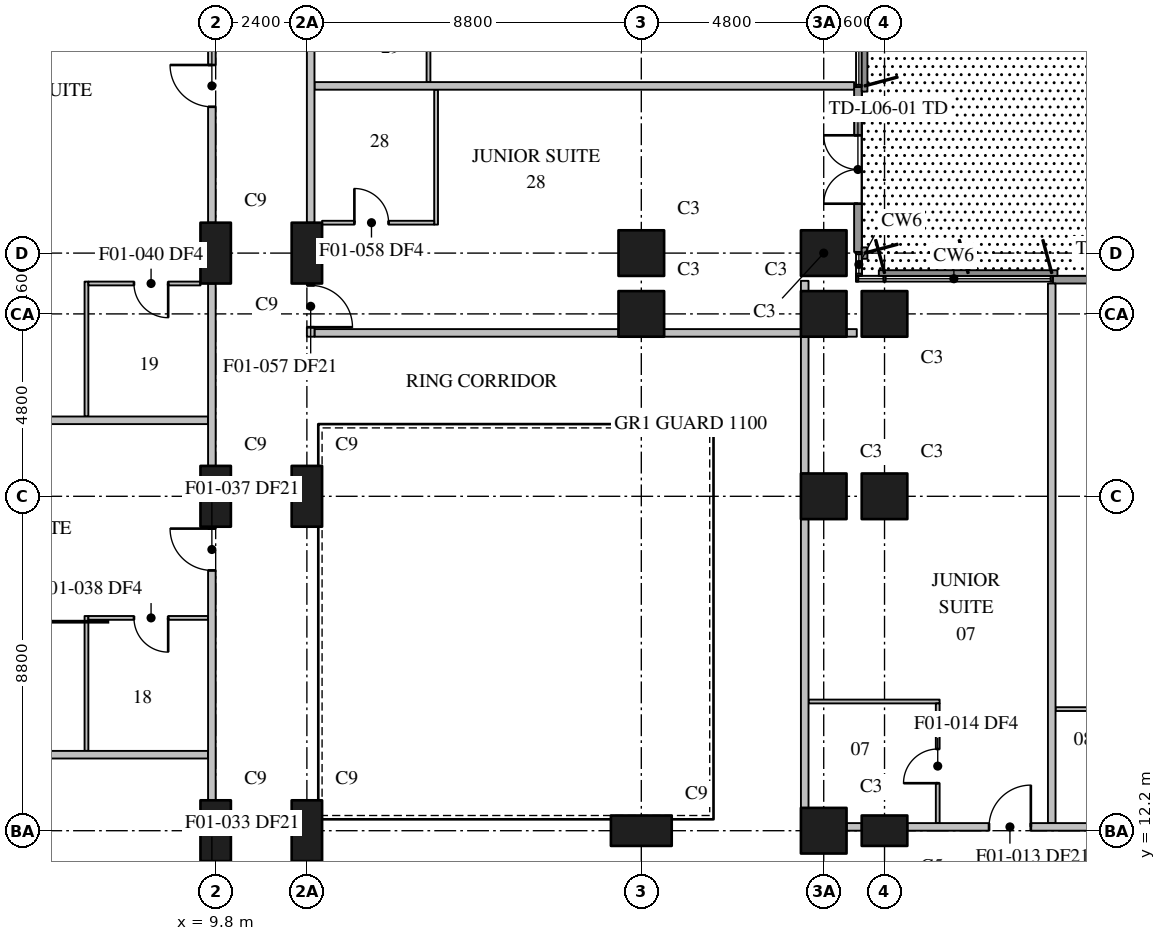
"""IFC4 building model, lengths in metres.
Left out: names, types, materials, properties, quantities, classifications, styles, units other than length and angle.
Written with IfcOpenShell. Run it as: python <this file> out.ifc"""

import sys

from ifc_helpers import new_model, si_unit, direction, frame, frame_2d, origin, origin_2d, place, context, subcontext, project, spatial, rectangle, extrude, element, fill, save


model = new_model("IFC4")
c1 = context("Model", 3, precision=1e-05, world=origin(), true_north=direction((0.0, 1.0)))
c2 = subcontext(c1, "Body", "Model", "MODEL_VIEW")
j1 = project(units=[si_unit("LENGTHUNIT", "METRE"), si_unit("PLANEANGLEUNIT", "RADIAN")], contexts=[c1])
p1 = place(None, origin())
s1 = spatial("IfcSite", under=j1, at=p1, CompositionType="ELEMENT")
p2 = place(p1, origin())
s2 = spatial("IfcBuilding", under=s1, at=p2, CompositionType="ELEMENT")
p3 = place(p2, frame((0.0, 0.0, 34.0)))
s3 = spatial("IfcBuildingStorey", under=s2, at=p3, CompositionType="ELEMENT", Elevation=34.0)
for number, where, z_axis, x_axis in (
    (1, (9.8, 12.2, 0.0), (0.0, 0.0, 1.0), (0.0, 1.0, 0.0)),
    (2, (9.8, 21.0, 0.0), (0.0, 0.0, 1.0), (0.0, 1.0, 0.0)),
    (3, (9.8, 27.4, 0.0), (0.0, 0.0, 1.0), (0.0, 1.0, 0.0)),
    (4, (12.2, 12.2, 0.0), (0.0, 0.0, 1.0), (0.0, 1.0, 0.0)),
    (5, (12.2, 21.0, 0.0), (0.0, 0.0, 1.0), (0.0, 1.0, 0.0)),
    (6, (12.2, 27.4, 0.0), (0.0, 0.0, 1.0), (0.0, 1.0, 0.0)),
    (7, (21.0, 12.2, 0.0), (0.0, 0.0, 1.0), (1.0, 0.0, 0.0)),
):
    element("IfcColumn", number, at=place(p3, frame(where, z_axis=z_axis, x_axis=x_axis)), inside=s3, PredefinedType="COLUMN", context=c2, shape_type="SweptSolid", body=[
        extrude(rectangle(XDim=1.6, YDim=0.8, at=origin_2d()), origin(), (0.0, 0.0, 1.0), 3.7),
    ])
for number, where, z_axis, x_axis in (
    (8, (21.0, 25.8, 0.0), (0.0, 0.0, 1.0), (1.0, 0.0, 0.0)),
    (9, (21.0, 27.4, 0.0), (0.0, 0.0, 1.0), (1.0, 0.0, 0.0)),
    (10, (25.8, 12.2, 0.0), (0.0, 0.0, 1.0), (1.0, 0.0, 0.0)),
    (11, (25.8, 21.0, 0.0), (0.0, 0.0, 1.0), (1.0, 0.0, 0.0)),
    (12, (25.8, 25.8, 0.0), (0.0, 0.0, 1.0), (1.0, 0.0, 0.0)),
    (13, (25.8, 27.4, 0.0), (0.0, 0.0, 1.0), (1.0, 0.0, 0.0)),
):
    element("IfcColumn", number, at=place(p3, frame(where, z_axis=z_axis, x_axis=x_axis)), inside=s3, PredefinedType="COLUMN", context=c2, shape_type="SweptSolid", body=[
        extrude(rectangle(XDim=1.2, YDim=1.2, at=origin_2d()), origin(), (0.0, 0.0, 1.0), 3.7),
    ])
p4 = place(p3, frame((27.4, 12.2, 0.0), z_axis=(0.0, 0.0, 1.0), x_axis=(1.0, 0.0, 0.0)))
e14 = element("IfcColumn", 14, at=p4, inside=s3, PredefinedType="COLUMN", context=c2, shape_type="SweptSolid", body=[
    extrude(rectangle(XDim=1.2, YDim=0.8, at=origin_2d()), origin(), (0.0, 0.0, 1.0), 3.7),
])
for number, where, z_axis, x_axis in (
    (15, (27.4, 21.0, 0.0), (0.0, 0.0, 1.0), (1.0, 0.0, 0.0)),
    (16, (27.4, 25.8, 0.0), (0.0, 0.0, 1.0), (1.0, 0.0, 0.0)),
):
    element("IfcColumn", number, at=place(p3, frame(where, z_axis=z_axis, x_axis=x_axis)), inside=s3, PredefinedType="COLUMN", context=c2, shape_type="SweptSolid", body=[
        extrude(rectangle(XDim=1.2, YDim=1.2, at=origin_2d()), origin(), (0.0, 0.0, 1.0), 3.7),
    ])
p5 = place(p3, frame((36.17, 26.7, 0.0), z_axis=(0.0, 0.0, 1.0), x_axis=(-1.0, 0.0, 0.0)))
e17 = element("IfcWall", 17, at=p5, inside=s3, PredefinedType="STANDARD", context=c2, shape_type="SweptSolid", body=[
    extrude(rectangle(XDim=4.34, YDim=0.2, at=frame_2d((2.17, 0.0))), origin(), (0.0, 0.0, 1.0), 3.4),
])
p6 = place(p5, frame((1.27, 0.0, 0.0)))
e18 = element("IfcOpeningElement", 18, at=p6, cuts=e17, PredefinedType="OPENING", context=c2, shape_type="SweptSolid", body=[
    extrude(rectangle(XDim=1.8, YDim=2.4, at=frame_2d((0.9, 1.2))), frame((0.0, 0.11, 0.0), z_axis=(0.0, -1.0, 0.0), x_axis=(1.0, 0.0, 0.0)), (0.0, 0.0, 1.0), 0.22),
])
p7 = place(p3, frame((26.7, 27.43, 0.0), z_axis=(0.0, 0.0, 1.0), x_axis=(0.0, 1.0, 0.0)))
e19 = element("IfcWall", 19, at=p7, inside=s3, PredefinedType="STANDARD", context=c2, shape_type="SweptSolid", body=[
    extrude(rectangle(XDim=4.34, YDim=0.2, at=frame_2d((2.17, 0.0))), origin(), (0.0, 0.0, 1.0), 3.4),
])
p8 = place(p7, frame((1.27, 0.0, 0.0)))
e20 = element("IfcOpeningElement", 20, at=p8, cuts=e19, PredefinedType="OPENING", context=c2, shape_type="SweptSolid", body=[
    extrude(rectangle(XDim=1.8, YDim=2.4, at=frame_2d((0.9, 1.2))), frame((0.0, 0.11, 0.0), z_axis=(0.0, -1.0, 0.0), x_axis=(1.0, 0.0, 0.0)), (0.0, 0.0, 1.0), 0.22),
])
p9 = place(p3, frame((26.4, 12.3, 0.0), z_axis=(0.0, 0.0, 1.0), x_axis=(1.0, 0.0, 0.0)))
e21 = element("IfcWall", 21, at=p9, inside=s3, PredefinedType="PARTITIONING", context=c2, shape_type="SweptSolid", body=[
    extrude(rectangle(XDim=0.4, YDim=0.2, at=frame_2d((0.2, 0.0))), origin(), (0.0, 0.0, 1.0), 3.4),
])
p10 = place(p3, frame((28.0, 12.3, 0.0), z_axis=(0.0, 0.0, 1.0), x_axis=(1.0, 0.0, 0.0)))
e22 = element("IfcWall", 22, at=p10, inside=s3, PredefinedType="PARTITIONING", context=c2, shape_type="SweptSolid", body=[
    extrude(rectangle(XDim=7.4, YDim=0.2, at=frame_2d((3.7, 0.0))), origin(), (0.0, 0.0, 1.0), 3.4),
])
p11 = place(p10, frame((2.15, 0.0, 0.0)))
e23 = element("IfcOpeningElement", 23, at=p11, cuts=e22, PredefinedType="OPENING", context=c2, shape_type="SweptSolid", body=[
    extrude(rectangle(XDim=1.1, YDim=2.1, at=frame_2d((0.55, 1.05))), frame((0.0, 0.11, 0.0), z_axis=(0.0, -1.0, 0.0), x_axis=(1.0, 0.0, 0.0)), (0.0, 0.0, 1.0), 0.22),
])
p12 = place(p10, frame((6.35, 0.0, 0.0)))
e24 = element("IfcOpeningElement", 24, at=p12, cuts=e22, PredefinedType="OPENING", context=c2, shape_type="SweptSolid", body=[
    extrude(rectangle(XDim=1.0, YDim=2.1, at=frame_2d((0.5, 1.05))), frame((0.0, 0.11, 0.0), z_axis=(0.0, -1.0, 0.0), x_axis=(1.0, 0.0, 0.0)), (0.0, 0.0, 1.0), 0.22),
])
p13 = place(p3, frame((25.3, 12.8, 0.0), z_axis=(0.0, 0.0, 1.0), x_axis=(0.0, 1.0, 0.0)))
e25 = element("IfcWall", 25, at=p13, inside=s3, PredefinedType="PARTITIONING", context=c2, shape_type="SweptSolid", body=[
    extrude(rectangle(XDim=7.6, YDim=0.2, at=frame_2d((3.8, 0.0))), origin(), (0.0, 0.0, 1.0), 3.4),
])
p14 = place(p3, frame((25.3, 21.6, 0.0), z_axis=(0.0, 0.0, 1.0), x_axis=(0.0, 1.0, 0.0)))
e26 = element("IfcWall", 26, at=p14, inside=s3, PredefinedType="PARTITIONING", context=c2, shape_type="SweptSolid", body=[
    extrude(rectangle(XDim=3.6, YDim=0.2, at=frame_2d((1.8, 0.0))), origin(), (0.0, 0.0, 1.0), 3.4),
])
p15 = place(p3, frame((25.3, 26.4, 0.0), z_axis=(0.0, 0.0, 1.0), x_axis=(0.0, 1.0, 0.0)))
e27 = element("IfcWall", 27, at=p15, inside=s3, PredefinedType="PARTITIONING", context=c2, shape_type="SweptSolid", body=[
    extrude(rectangle(XDim=0.27, YDim=0.2, at=frame_2d((0.135, 0.0))), origin(), (0.0, 0.0, 1.0), 3.4),
])
p16 = place(p3, frame((31.8, 12.4, 0.0), z_axis=(0.0, 0.0, 1.0), x_axis=(0.0, 1.0, 0.0)))
e28 = element("IfcWall", 28, at=p16, inside=s3, PredefinedType="PARTITIONING", context=c2, shape_type="SweptSolid", body=[
    extrude(rectangle(XDim=14.2, YDim=0.2, at=frame_2d((7.1, 0.0))), origin(), (0.0, 0.0, 1.0), 3.4),
])
p17 = place(p3, frame((9.7, 13.0, 0.0), z_axis=(0.0, 0.0, 1.0), x_axis=(0.0, 1.0, 0.0)))
e29 = element("IfcWall", 29, at=p17, inside=s3, PredefinedType="PARTITIONING", context=c2, shape_type="SweptSolid", body=[
    extrude(rectangle(XDim=7.2, YDim=0.2, at=frame_2d((3.6, 0.0))), origin(), (0.0, 0.0, 1.0), 3.4),
])
p18 = place(p17, frame((6.05, 0.0, 0.0)))
e30 = element("IfcOpeningElement", 30, at=p18, cuts=e29, PredefinedType="OPENING", context=c2, shape_type="SweptSolid", body=[
    extrude(rectangle(XDim=1.1, YDim=2.1, at=frame_2d((0.55, 1.05))), frame((0.0, 0.11, 0.0), z_axis=(0.0, -1.0, 0.0), x_axis=(1.0, 0.0, 0.0)), (0.0, 0.0, 1.0), 0.22),
])
p19 = place(p3, frame((9.7, 21.8, 0.0), z_axis=(0.0, 0.0, 1.0), x_axis=(0.0, 1.0, 0.0)))
e31 = element("IfcWall", 31, at=p19, inside=s3, PredefinedType="PARTITIONING", context=c2, shape_type="SweptSolid", body=[
    extrude(rectangle(XDim=4.8, YDim=0.2, at=frame_2d((2.4, 0.0))), origin(), (0.0, 0.0, 1.0), 3.4),
])
p20 = place(p3, frame((9.7, 28.2, 0.0), z_axis=(0.0, 0.0, 1.0), x_axis=(0.0, 1.0, 0.0)))
e32 = element("IfcWall", 32, at=p20, inside=s3, PredefinedType="PARTITIONING", context=c2, shape_type="SweptSolid", body=[
    extrude(rectangle(XDim=7.2, YDim=0.2, at=frame_2d((3.6, 0.0))), origin(), (0.0, 0.0, 1.0), 3.4),
])
p21 = place(p20, frame((3.05, 0.0, 0.0)))
e33 = element("IfcOpeningElement", 33, at=p21, cuts=e32, PredefinedType="OPENING", context=c2, shape_type="SweptSolid", body=[
    extrude(rectangle(XDim=1.1, YDim=2.1, at=frame_2d((0.55, 1.05))), frame((0.0, 0.11, 0.0), z_axis=(0.0, -1.0, 0.0), x_axis=(1.0, 0.0, 0.0)), (0.0, 0.0, 1.0), 0.22),
])
for number, where, z_axis, x_axis in (
    (34, (0.31, 14.2, 0.0), (0.0, 0.0, 1.0), (1.0, 0.0, 0.0)),
    (35, (0.31, 23.0, 0.0), (0.0, 0.0, 1.0), (1.0, 0.0, 0.0)),
):
    element("IfcWall", number, at=place(p3, frame(where, z_axis=z_axis, x_axis=x_axis)), inside=s3, PredefinedType="PARTITIONING", context=c2, shape_type="SweptSolid", body=[
        extrude(rectangle(XDim=9.29, YDim=0.2, at=frame_2d((4.645, 0.0))), origin(), (0.0, 0.0, 1.0), 3.4),
    ])
p22 = place(p3, frame((12.3, 26.6, 0.0), z_axis=(0.0, 0.0, 1.0), x_axis=(0.0, -1.0, 0.0)))
e36 = element("IfcWall", 36, at=p22, inside=s3, PredefinedType="PARTITIONING", context=c2, shape_type="SweptSolid", body=[
    extrude(rectangle(XDim=1.4, YDim=0.2, at=frame_2d((0.7, 0.0))), origin(), (0.0, 0.0, 1.0), 3.4),
])
p23 = place(p22, frame((0.05, 0.0, 0.0)))
e37 = element("IfcOpeningElement", 37, at=p23, cuts=e36, PredefinedType="OPENING", context=c2, shape_type="SweptSolid", body=[
    extrude(rectangle(XDim=1.1, YDim=2.1, at=frame_2d((0.55, 1.05))), frame((0.0, 0.11, 0.0), z_axis=(0.0, -1.0, 0.0), x_axis=(1.0, 0.0, 0.0)), (0.0, 0.0, 1.0), 0.22),
])
p24 = place(p3, frame((12.3, 35.4, 0.0), z_axis=(0.0, 0.0, 1.0), x_axis=(0.0, -1.0, 0.0)))
e38 = element("IfcWall", 38, at=p24, inside=s3, PredefinedType="PARTITIONING", context=c2, shape_type="SweptSolid", body=[
    extrude(rectangle(XDim=7.2, YDim=0.2, at=frame_2d((3.6, 0.0))), origin(), (0.0, 0.0, 1.0), 3.4),
])
p25 = place(p24, frame((0.05, 0.0, 0.0)))
e39 = element("IfcOpeningElement", 39, at=p25, cuts=e38, PredefinedType="OPENING", context=c2, shape_type="SweptSolid", body=[
    extrude(rectangle(XDim=1.0, YDim=2.1, at=frame_2d((0.5, 1.05))), frame((0.0, 0.11, 0.0), z_axis=(0.0, -1.0, 0.0), x_axis=(1.0, 0.0, 0.0)), (0.0, 0.0, 1.0), 0.22),
])
p26 = place(p3, frame((12.4, 25.3, 0.0), z_axis=(0.0, 0.0, 1.0), x_axis=(1.0, 0.0, 0.0)))
e40 = element("IfcWall", 40, at=p26, inside=s3, PredefinedType="PARTITIONING", context=c2, shape_type="SweptSolid", body=[
    extrude(rectangle(XDim=8.0, YDim=0.2, at=frame_2d((4.0, 0.0))), origin(), (0.0, 0.0, 1.0), 3.4),
])
p27 = place(p3, frame((21.6, 25.3, 0.0), z_axis=(0.0, 0.0, 1.0), x_axis=(1.0, 0.0, 0.0)))
e41 = element("IfcWall", 41, at=p27, inside=s3, PredefinedType="PARTITIONING", context=c2, shape_type="SweptSolid", body=[
    extrude(rectangle(XDim=3.6, YDim=0.2, at=frame_2d((1.8, 0.0))), origin(), (0.0, 0.0, 1.0), 3.4),
])
p28 = place(p3, frame((26.4, 25.3, 0.0), z_axis=(0.0, 0.0, 1.0), x_axis=(1.0, 0.0, 0.0)))
e42 = element("IfcWall", 42, at=p28, inside=s3, PredefinedType="PARTITIONING", context=c2, shape_type="SweptSolid", body=[
    extrude(rectangle(XDim=0.27, YDim=0.2, at=frame_2d((0.135, 0.0))), origin(), (0.0, 0.0, 1.0), 3.4),
])
p29 = place(p3, frame((12.4, 31.8, 0.0), z_axis=(0.0, 0.0, 1.0), x_axis=(1.0, 0.0, 0.0)))
e43 = element("IfcWall", 43, at=p29, inside=s3, PredefinedType="PARTITIONING", context=c2, shape_type="SweptSolid", body=[
    extrude(rectangle(XDim=14.2, YDim=0.2, at=frame_2d((7.1, 0.0))), origin(), (0.0, 0.0, 1.0), 3.4),
])
p30 = place(p3, frame((25.4, 15.6, 0.0), z_axis=(0.0, 0.0, 1.0), x_axis=(1.0, 0.0, 0.0)))
e44 = element("IfcWall", 44, at=p30, inside=s3, PredefinedType="PARTITIONING", context=c2, shape_type="SweptSolid", body=[
    extrude(rectangle(XDim=3.45, YDim=0.1, at=frame_2d((1.725, 0.0))), origin(), (0.0, 0.0, 1.0), 3.4),
])
p31 = place(p3, frame((28.8, 12.4, 0.0), z_axis=(0.0, 0.0, 1.0), x_axis=(0.0, 1.0, 0.0)))
e45 = element("IfcWall", 45, at=p31, inside=s3, PredefinedType="PARTITIONING", context=c2, shape_type="SweptSolid", body=[
    extrude(rectangle(XDim=3.15, YDim=0.1, at=frame_2d((1.575, 0.0))), origin(), (0.0, 0.0, 1.0), 3.4),
])
p32 = place(p31, frame((1.05, 0.0, 0.0)))
e46 = element("IfcOpeningElement", 46, at=p32, cuts=e45, PredefinedType="OPENING", context=c2, shape_type="SweptSolid", body=[
    extrude(rectangle(XDim=0.9, YDim=2.1, at=frame_2d((0.45, 1.05))), frame((0.0, 0.06, 0.0), z_axis=(0.0, -1.0, 0.0), x_axis=(1.0, 0.0, 0.0)), (0.0, 0.0, 1.0), 0.12),
])
p33 = place(p3, frame((31.9, 15.4, 0.0), z_axis=(0.0, 0.0, 1.0), x_axis=(1.0, 0.0, 0.0)))
e47 = element("IfcWall", 47, at=p33, inside=s3, PredefinedType="PARTITIONING", context=c2, shape_type="SweptSolid", body=[
    extrude(rectangle(XDim=2.25, YDim=0.1, at=frame_2d((1.125, 0.0))), origin(), (0.0, 0.0, 1.0), 3.4),
])
p34 = place(p3, frame((6.4, 14.3, 0.0), z_axis=(0.0, 0.0, 1.0), x_axis=(0.0, 1.0, 0.0)))
e48 = element("IfcWall", 48, at=p34, inside=s3, PredefinedType="PARTITIONING", context=c2, shape_type="SweptSolid", body=[
    extrude(rectangle(XDim=3.55, YDim=0.1, at=frame_2d((1.775, 0.0))), origin(), (0.0, 0.0, 1.0), 3.4),
])
p35 = place(p3, frame((6.4, 23.1, 0.0), z_axis=(0.0, 0.0, 1.0), x_axis=(0.0, 1.0, 0.0)))
e49 = element("IfcWall", 49, at=p35, inside=s3, PredefinedType="PARTITIONING", context=c2, shape_type="SweptSolid", body=[
    extrude(rectangle(XDim=3.55, YDim=0.1, at=frame_2d((1.775, 0.0))), origin(), (0.0, 0.0, 1.0), 3.4),
])
p36 = place(p3, frame((9.6, 17.8, 0.0), z_axis=(0.0, 0.0, 1.0), x_axis=(-1.0, 0.0, 0.0)))
e50 = element("IfcWall", 50, at=p36, inside=s3, PredefinedType="PARTITIONING", context=c2, shape_type="SweptSolid", body=[
    extrude(rectangle(XDim=3.15, YDim=0.1, at=frame_2d((1.575, 0.0))), origin(), (0.0, 0.0, 1.0), 3.4),
])
p37 = place(p36, frame((1.05, 0.0, 0.0)))
e51 = element("IfcOpeningElement", 51, at=p37, cuts=e50, PredefinedType="OPENING", context=c2, shape_type="SweptSolid", body=[
    extrude(rectangle(XDim=0.9, YDim=2.1, at=frame_2d((0.45, 1.05))), frame((0.0, 0.06, 0.0), z_axis=(0.0, -1.0, 0.0), x_axis=(1.0, 0.0, 0.0)), (0.0, 0.0, 1.0), 0.12),
])
p38 = place(p3, frame((9.4, 26.6, 0.0), z_axis=(0.0, 0.0, 1.0), x_axis=(-1.0, 0.0, 0.0)))
e52 = element("IfcWall", 52, at=p38, inside=s3, PredefinedType="PARTITIONING", context=c2, shape_type="SweptSolid", body=[
    extrude(rectangle(XDim=2.95, YDim=0.1, at=frame_2d((1.475, 0.0))), origin(), (0.0, 0.0, 1.0), 3.4),
])
p39 = place(p38, frame((0.85, 0.0, 0.0)))
e53 = element("IfcOpeningElement", 53, at=p39, cuts=e52, PredefinedType="OPENING", context=c2, shape_type="SweptSolid", body=[
    extrude(rectangle(XDim=0.9, YDim=2.1, at=frame_2d((0.45, 1.05))), frame((0.0, 0.06, 0.0), z_axis=(0.0, -1.0, 0.0), x_axis=(1.0, 0.0, 0.0)), (0.0, 0.0, 1.0), 0.12),
])
p40 = place(p3, frame((15.6, 28.15, 0.0), z_axis=(0.0, 0.0, 1.0), x_axis=(0.0, 1.0, 0.0)))
e54 = element("IfcWall", 54, at=p40, inside=s3, PredefinedType="PARTITIONING", context=c2, shape_type="SweptSolid", body=[
    extrude(rectangle(XDim=3.55, YDim=0.1, at=frame_2d((1.775, 0.0))), origin(), (0.0, 0.0, 1.0), 3.4),
])
p41 = place(p3, frame((12.6, 28.2, 0.0), z_axis=(0.0, 0.0, 1.0), x_axis=(1.0, 0.0, 0.0)))
e55 = element("IfcWall", 55, at=p41, inside=s3, PredefinedType="PARTITIONING", context=c2, shape_type="SweptSolid", body=[
    extrude(rectangle(XDim=2.95, YDim=0.1, at=frame_2d((1.475, 0.0))), origin(), (0.0, 0.0, 1.0), 3.4),
])
p42 = place(p41, frame((0.85, 0.0, 0.0)))
e56 = element("IfcOpeningElement", 56, at=p42, cuts=e55, PredefinedType="OPENING", context=c2, shape_type="SweptSolid", body=[
    extrude(rectangle(XDim=0.9, YDim=2.1, at=frame_2d((0.45, 1.05))), frame((0.0, 0.06, 0.0), z_axis=(0.0, -1.0, 0.0), x_axis=(1.0, 0.0, 0.0)), (0.0, 0.0, 1.0), 0.12),
])
p43 = place(p3, frame((15.4, 31.9, 0.0), z_axis=(0.0, 0.0, 1.0), x_axis=(0.0, 1.0, 0.0)))
e57 = element("IfcWall", 57, at=p43, inside=s3, PredefinedType="PARTITIONING", context=c2, shape_type="SweptSolid", body=[
    extrude(rectangle(XDim=2.25, YDim=0.1, at=frame_2d((1.125, 0.0))), origin(), (0.0, 0.0, 1.0), 3.4),
])
p44 = place(p8, origin())
e58 = element("IfcDoor", 58, at=p44, inside=s3, OperationType="SINGLE_SWING_LEFT", PredefinedType="DOOR", context=c2, shape_type="SweptSolid", body=[
    extrude(rectangle(XDim=1.8, YDim=2.4, at=frame_2d((0.9, 1.2))), frame((0.0, 0.025, 0.0), z_axis=(0.0, -1.0, 0.0), x_axis=(1.0, 0.0, 0.0)), (0.0, 0.0, 1.0), 0.05),
])
fill(e20, e58)
p45 = place(p11, origin())
e59 = element("IfcDoor", 59, at=p45, inside=s3, OperationType="SINGLE_SWING_RIGHT", PredefinedType="DOOR", context=c2, shape_type="SweptSolid", body=[
    extrude(rectangle(XDim=1.1, YDim=2.1, at=frame_2d((0.55, 1.05))), frame((0.0, 0.025, 0.0), z_axis=(0.0, -1.0, 0.0), x_axis=(1.0, 0.0, 0.0)), (0.0, 0.0, 1.0), 0.05),
])
fill(e23, e59)
p46 = place(p32, origin())
e60 = element("IfcDoor", 60, at=p46, inside=s3, OperationType="SINGLE_SWING_LEFT", PredefinedType="DOOR", context=c2, shape_type="SweptSolid", body=[
    extrude(rectangle(XDim=0.9, YDim=2.1, at=frame_2d((0.45, 1.05))), frame((0.0, 0.025, 0.0), z_axis=(0.0, -1.0, 0.0), x_axis=(1.0, 0.0, 0.0)), (0.0, 0.0, 1.0), 0.05),
])
fill(e46, e60)
p47 = place(p18, origin())
e61 = element("IfcDoor", 61, at=p47, inside=s3, OperationType="SINGLE_SWING_RIGHT", PredefinedType="DOOR", context=c2, shape_type="SweptSolid", body=[
    extrude(rectangle(XDim=1.1, YDim=2.1, at=frame_2d((0.55, 1.05))), frame((0.0, 0.025, 0.0), z_axis=(0.0, -1.0, 0.0), x_axis=(1.0, 0.0, 0.0)), (0.0, 0.0, 1.0), 0.05),
])
fill(e30, e61)
p48 = place(p37, origin())
e62 = element("IfcDoor", 62, at=p48, inside=s3, OperationType="SINGLE_SWING_LEFT", PredefinedType="DOOR", context=c2, shape_type="SweptSolid", body=[
    extrude(rectangle(XDim=0.9, YDim=2.1, at=frame_2d((0.45, 1.05))), frame((0.0, 0.025, 0.0), z_axis=(0.0, -1.0, 0.0), x_axis=(1.0, 0.0, 0.0)), (0.0, 0.0, 1.0), 0.05),
])
fill(e51, e62)
p49 = place(p21, origin())
e63 = element("IfcDoor", 63, at=p49, inside=s3, OperationType="SINGLE_SWING_RIGHT", PredefinedType="DOOR", context=c2, shape_type="SweptSolid", body=[
    extrude(rectangle(XDim=1.1, YDim=2.1, at=frame_2d((0.55, 1.05))), frame((0.0, 0.025, 0.0), z_axis=(0.0, -1.0, 0.0), x_axis=(1.0, 0.0, 0.0)), (0.0, 0.0, 1.0), 0.05),
])
fill(e33, e63)
p50 = place(p39, origin())
e64 = element("IfcDoor", 64, at=p50, inside=s3, OperationType="SINGLE_SWING_LEFT", PredefinedType="DOOR", context=c2, shape_type="SweptSolid", body=[
    extrude(rectangle(XDim=0.9, YDim=2.1, at=frame_2d((0.45, 1.05))), frame((0.0, 0.025, 0.0), z_axis=(0.0, -1.0, 0.0), x_axis=(1.0, 0.0, 0.0)), (0.0, 0.0, 1.0), 0.05),
])
fill(e53, e64)
p51 = place(p23, origin())
e65 = element("IfcDoor", 65, at=p51, inside=s3, OperationType="SINGLE_SWING_RIGHT", PredefinedType="DOOR", context=c2, shape_type="SweptSolid", body=[
    extrude(rectangle(XDim=1.1, YDim=2.1, at=frame_2d((0.55, 1.05))), frame((0.0, 0.025, 0.0), z_axis=(0.0, -1.0, 0.0), x_axis=(1.0, 0.0, 0.0)), (0.0, 0.0, 1.0), 0.05),
])
fill(e37, e65)
p52 = place(p42, origin())
e66 = element("IfcDoor", 66, at=p52, inside=s3, OperationType="SINGLE_SWING_LEFT", PredefinedType="DOOR", context=c2, shape_type="SweptSolid", body=[
    extrude(rectangle(XDim=0.9, YDim=2.1, at=frame_2d((0.45, 1.05))), frame((0.0, 0.025, 0.0), z_axis=(0.0, -1.0, 0.0), x_axis=(1.0, 0.0, 0.0)), (0.0, 0.0, 1.0), 0.05),
])
fill(e56, e66)
save(model, sys.argv[1])
